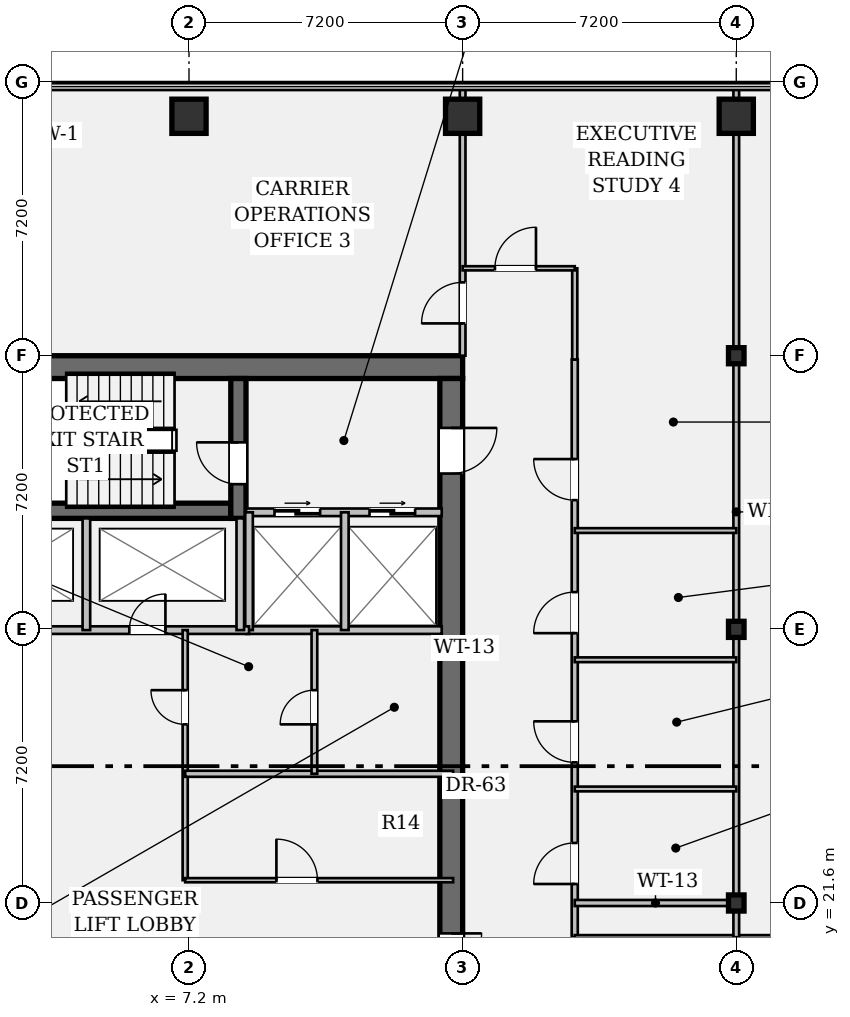
"""IFC4 building model, lengths in metres.
Left out: names, types, materials, properties, quantities, classifications, styles, units other than length and angle.
Written with IfcOpenShell. Run it as: python <this file> out.ifc"""

import sys

from ifc_helpers import new_model, si_unit, direction, frame, frame_2d, origin, origin_2d, place, context, subcontext, project, spatial, rectangle, hollow_rectangle, i_section, extrude, element, fill, save


model = new_model("IFC4")
c1 = context("Model", 3, precision=1e-05, world=origin(), true_north=direction((0.0, 1.0)))
c2 = subcontext(c1, "Body", "Model", "MODEL_VIEW")
j1 = project(units=[si_unit("LENGTHUNIT", "METRE"), si_unit("PLANEANGLEUNIT", "RADIAN")], contexts=[c1])
p1 = place(None, origin())
s1 = spatial("IfcSite", under=j1, at=p1, CompositionType="ELEMENT")
p2 = place(p1, origin())
s2 = spatial("IfcBuilding", under=s1, at=p2, CompositionType="ELEMENT")
p3 = place(p2, frame((0.0, 0.0, 133.0)))
s3 = spatial("IfcBuildingStorey", under=s2, at=p3, CompositionType="ELEMENT", Elevation=133.0)
p4 = place(p3, frame((0.6, 35.7, 0.0), z_axis=(0.0, 0.0, 1.0), x_axis=(1.0, 0.0, 0.0)))
e1 = element("IfcWall", 1, at=p4, inside=s3, PredefinedType="SHEAR", context=c2, shape_type="SweptSolid", body=[
    extrude(rectangle(XDim=13.8, YDim=0.6, at=frame_2d((6.9, 0.0))), origin(), (0.0, 0.0, 1.0), 3.58),
])
p5 = place(p3, frame((14.1, 35.4, 0.0), z_axis=(0.0, 0.0, 1.0), x_axis=(0.0, -1.0, 0.0)))
e2 = element("IfcWall", 2, at=p5, inside=s3, PredefinedType="SHEAR", context=c2, shape_type="SweptSolid", body=[
    extrude(rectangle(XDim=27.6, YDim=0.6, at=frame_2d((13.8, 0.0))), origin(), (0.0, 0.0, 1.0), 3.58),
])
p6 = place(p5, frame((1.3, 0.0, 0.0)))
e3 = element("IfcOpeningElement", 3, at=p6, cuts=e2, PredefinedType="OPENING", context=c2, shape_type="SweptSolid", body=[
    extrude(rectangle(XDim=1.2, YDim=2.15, at=frame_2d((0.6, 1.075))), frame((0.0, 0.312, 0.0), z_axis=(0.0, -1.0, 0.0), x_axis=(1.0, 0.0, 0.0)), (0.0, 0.0, 1.0), 0.624),
])
p7 = place(p5, frame((25.25, 0.0, 0.0)))
e4 = element("IfcOpeningElement", 4, at=p7, cuts=e2, PredefinedType="OPENING", context=c2, shape_type="SweptSolid", body=[
    extrude(rectangle(XDim=1.2, YDim=2.15, at=frame_2d((0.6, 1.075))), frame((0.0, 0.312, 0.0), z_axis=(0.0, -1.0, 0.0), x_axis=(1.0, 0.0, 0.0)), (0.0, 0.0, 1.0), 0.624),
])
p8 = place(p5, frame((14.6, 0.0, 0.0)))
e5 = element("IfcOpeningElement", 5, at=p8, cuts=e2, PredefinedType="OPENING", context=c2, shape_type="SweptSolid", body=[
    extrude(rectangle(XDim=1.6, YDim=2.2, at=frame_2d((0.8, 1.1))), frame((0.0, 0.312, 0.0), z_axis=(0.0, -1.0, 0.0), x_axis=(1.0, 0.0, 0.0)), (0.0, 0.0, 1.0), 0.624),
])
p9 = place(p3, frame((0.6, 31.92, 0.0), z_axis=(0.0, 0.0, 1.0), x_axis=(1.0, 0.0, 0.0)))
e6 = element("IfcWall", 6, at=p9, inside=s3, PredefinedType="SHEAR", context=c2, shape_type="SweptSolid", body=[
    extrude(rectangle(XDim=7.7, YDim=0.4, at=frame_2d((3.85, 0.0))), origin(), (0.0, 0.0, 1.0), 3.58),
])
p10 = place(p3, frame((8.5, 31.72, 0.0), z_axis=(0.0, 0.0, 1.0), x_axis=(0.0, 1.0, 0.0)))
e7 = element("IfcWall", 7, at=p10, inside=s3, PredefinedType="SHEAR", context=c2, shape_type="SweptSolid", body=[
    extrude(rectangle(XDim=3.68, YDim=0.4, at=frame_2d((1.84, 0.0))), origin(), (0.0, 0.0, 1.0), 3.58),
])
p11 = place(p10, frame((0.9, 0.0, 0.0)))
e8 = element("IfcOpeningElement", 8, at=p11, cuts=e7, PredefinedType="OPENING", context=c2, shape_type="SweptSolid", body=[
    extrude(rectangle(XDim=1.1, YDim=2.15, at=frame_2d((0.55, 1.075))), frame((0.0, 0.212, 0.0), z_axis=(0.0, -1.0, 0.0), x_axis=(1.0, 0.0, 0.0)), (0.0, 0.0, 1.0), 0.424),
])
for number, where, z_axis, x_axis in (
    (9, (7.2, 42.3, 0.0), (0.0, 0.0, 1.0), (1.0, 0.0, 0.0)),
    (10, (14.4, 42.3, 0.0), (0.0, 0.0, 1.0), (1.0, 0.0, 0.0)),
):
    element("IfcColumn", number, at=place(p3, frame(where, z_axis=z_axis, x_axis=x_axis)), inside=s3, PredefinedType="COLUMN", context=c2, shape_type="SweptSolid", body=[
        extrude(hollow_rectangle(XDim=0.9, YDim=0.9, WallThickness=0.055, at=origin_2d()), origin(), (0.0, 0.0, 1.0), 3.58),
    ])
for number, where, z_axis, x_axis in (
    (11, (21.6, 21.6, 0.0), (0.0, 0.0, 1.0), (1.0, 0.0, 0.0)),
    (12, (21.6, 28.8, 0.0), (0.0, 0.0, 1.0), (1.0, 0.0, 0.0)),
    (13, (21.6, 36.0, 0.0), (0.0, 0.0, 1.0), (1.0, 0.0, 0.0)),
):
    element("IfcColumn", number, at=place(p3, frame(where, z_axis=z_axis, x_axis=x_axis)), inside=s3, PredefinedType="COLUMN", context=c2, shape_type="SweptSolid", body=[
        extrude(i_section(OverallWidth=0.409, OverallDepth=0.424, WebThickness=0.033, FlangeThickness=0.052, FilletRadius=0.018, at=origin_2d()), origin(), (0.0, 0.0, 1.0), 3.58),
    ])
p12 = place(p3, frame((21.6, 42.3, 0.0), z_axis=(0.0, 0.0, 1.0), x_axis=(1.0, 0.0, 0.0)))
e14 = element("IfcColumn", 14, at=p12, inside=s3, PredefinedType="COLUMN", context=c2, shape_type="SweptSolid", body=[
    extrude(hollow_rectangle(XDim=0.9, YDim=0.9, WallThickness=0.055, at=origin_2d()), origin(), (0.0, 0.0, 1.0), 3.58),
])
p13 = place(p3, frame((8.7, 31.88, 0.0), z_axis=(0.0, 0.0, 1.0), x_axis=(1.0, 0.0, 0.0)))
e15 = element("IfcWall", 15, at=p13, inside=s3, PredefinedType="PARTITIONING", context=c2, shape_type="SweptSolid", body=[
    extrude(rectangle(XDim=5.15, YDim=0.2, at=frame_2d((2.575, 0.0))), origin(), (0.0, 0.0, 1.0), 3.58),
])
p14 = place(p13, frame((0.75, 0.0, 0.0)))
e16 = element("IfcOpeningElement", 16, at=p14, cuts=e15, PredefinedType="OPENING", context=c2, shape_type="SweptSolid", body=[
    extrude(rectangle(XDim=1.2, YDim=2.2, at=frame_2d((0.6, 1.1))), frame((0.0, 0.112, 0.0), z_axis=(0.0, -1.0, 0.0), x_axis=(1.0, 0.0, 0.0)), (0.0, 0.0, 1.0), 0.224),
])
p15 = place(p13, frame((3.25, 0.0, 0.0)))
e17 = element("IfcOpeningElement", 17, at=p15, cuts=e15, PredefinedType="OPENING", context=c2, shape_type="SweptSolid", body=[
    extrude(rectangle(XDim=1.2, YDim=2.2, at=frame_2d((0.6, 1.1))), frame((0.0, 0.112, 0.0), z_axis=(0.0, -1.0, 0.0), x_axis=(1.0, 0.0, 0.0)), (0.0, 0.0, 1.0), 0.224),
])
p16 = place(p3, frame((8.7, 28.78, 0.0), z_axis=(0.0, 0.0, 1.0), x_axis=(1.0, 0.0, 0.0)))
e18 = element("IfcWall", 18, at=p16, inside=s3, PredefinedType="PARTITIONING", context=c2, shape_type="SweptSolid", body=[
    extrude(rectangle(XDim=5.15, YDim=0.2, at=frame_2d((2.575, 0.0))), origin(), (0.0, 0.0, 1.0), 3.58),
])
for number, where, z_axis, x_axis in (
    (19, (8.78, 28.78, 0.0), (0.0, 0.0, 1.0), (0.0, 1.0, 0.0)),
    (20, (11.3, 28.78, 0.0), (0.0, 0.0, 1.0), (0.0, 1.0, 0.0)),
):
    element("IfcWall", number, at=place(p3, frame(where, z_axis=z_axis, x_axis=x_axis)), inside=s3, PredefinedType="PARTITIONING", context=c2, shape_type="SweptSolid", body=[
        extrude(rectangle(XDim=3.1, YDim=0.2, at=frame_2d((1.55, 0.0))), origin(), (0.0, 0.0, 1.0), 3.58),
    ])
p17 = place(p3, frame((0.6, 28.78, 0.0), z_axis=(0.0, 0.0, 1.0), x_axis=(1.0, 0.0, 0.0)))
e21 = element("IfcWall", 21, at=p17, inside=s3, PredefinedType="PARTITIONING", context=c2, shape_type="SweptSolid", body=[
    extrude(rectangle(XDim=8.18, YDim=0.2, at=frame_2d((4.09, 0.0))), origin(), (0.0, 0.0, 1.0), 3.58),
])
p18 = place(p17, frame((1.21, 0.0, 0.0)))
e22 = element("IfcOpeningElement", 22, at=p18, cuts=e21, PredefinedType="OPENING", context=c2, shape_type="SweptSolid", body=[
    extrude(rectangle(XDim=0.95, YDim=2.15, at=frame_2d((0.475, 1.075))), frame((0.0, 0.112, 0.0), z_axis=(0.0, -1.0, 0.0), x_axis=(1.0, 0.0, 0.0)), (0.0, 0.0, 1.0), 0.224),
])
p19 = place(p17, frame((5.03, 0.0, 0.0)))
e23 = element("IfcOpeningElement", 23, at=p19, cuts=e21, PredefinedType="OPENING", context=c2, shape_type="SweptSolid", body=[
    extrude(rectangle(XDim=0.95, YDim=2.15, at=frame_2d((0.475, 1.075))), frame((0.0, 0.112, 0.0), z_axis=(0.0, -1.0, 0.0), x_axis=(1.0, 0.0, 0.0)), (0.0, 0.0, 1.0), 0.224),
])
for number, where, z_axis, x_axis in (
    (24, (4.5, 28.78, 0.0), (0.0, 0.0, 1.0), (0.0, 1.0, 0.0)),
    (25, (8.55, 28.78, 0.0), (0.0, 0.0, 1.0), (0.0, 1.0, 0.0)),
):
    element("IfcWall", number, at=place(p3, frame(where, z_axis=z_axis, x_axis=x_axis)), inside=s3, PredefinedType="PARTITIONING", context=c2, shape_type="SweptSolid", body=[
        extrude(rectangle(XDim=2.94, YDim=0.2, at=frame_2d((1.47, 0.0))), origin(), (0.0, 0.0, 1.0), 3.58),
    ])
p20 = place(p3, frame((7.1, 22.2, 0.0), z_axis=(0.0, 0.0, 1.0), x_axis=(0.0, 1.0, 0.0)))
e26 = element("IfcWall", 26, at=p20, inside=s3, PredefinedType="PARTITIONING", context=c2, shape_type="SweptSolid", body=[
    extrude(rectangle(XDim=6.58, YDim=0.135, at=frame_2d((3.29, 0.0))), origin(), (0.0, 0.0, 1.0), 3.58),
])
p21 = place(p20, frame((4.1, 0.0, 0.0)))
e27 = element("IfcOpeningElement", 27, at=p21, cuts=e26, PredefinedType="OPENING", context=c2, shape_type="SweptSolid", body=[
    extrude(rectangle(XDim=0.9, YDim=2.15, at=frame_2d((0.45, 1.075))), frame((0.0, 0.08, 0.0), z_axis=(0.0, -1.0, 0.0), x_axis=(1.0, 0.0, 0.0)), (0.0, 0.0, 1.0), 0.159),
])
p22 = place(p3, frame((7.1, 22.2, 0.0), z_axis=(0.0, 0.0, 1.0), x_axis=(1.0, 0.0, 0.0)))
e28 = element("IfcWall", 28, at=p22, inside=s3, PredefinedType="PARTITIONING", context=c2, shape_type="SweptSolid", body=[
    extrude(rectangle(XDim=7.05, YDim=0.11, at=frame_2d((3.525, 0.0))), origin(), (0.0, 0.0, 1.0), 3.58),
])
p23 = place(p22, frame((2.4, 0.0, 0.0)))
e29 = element("IfcOpeningElement", 29, at=p23, cuts=e28, PredefinedType="OPENING", context=c2, shape_type="SweptSolid", body=[
    extrude(rectangle(XDim=1.08, YDim=2.15, at=frame_2d((0.54, 1.075))), frame((0.0, 0.067, 0.0), z_axis=(0.0, -1.0, 0.0), x_axis=(1.0, 0.0, 0.0)), (0.0, 0.0, 1.0), 0.134),
])
p24 = place(p3, frame((7.1, 25.0, 0.0), z_axis=(0.0, 0.0, 1.0), x_axis=(1.0, 0.0, 0.0)))
e30 = element("IfcWall", 30, at=p24, inside=s3, PredefinedType="PARTITIONING", context=c2, shape_type="SweptSolid", body=[
    extrude(rectangle(XDim=7.05, YDim=0.16, at=frame_2d((3.525, 0.0))), origin(), (0.0, 0.0, 1.0), 3.58),
])
p25 = place(p3, frame((10.5, 25.0, 0.0), z_axis=(0.0, 0.0, 1.0), x_axis=(0.0, 1.0, 0.0)))
e31 = element("IfcWall", 31, at=p25, inside=s3, PredefinedType="PARTITIONING", context=c2, shape_type="SweptSolid", body=[
    extrude(rectangle(XDim=3.78, YDim=0.15, at=frame_2d((1.89, 0.0))), origin(), (0.0, 0.0, 1.0), 3.58),
])
p26 = place(p25, frame((1.3, 0.0, 0.0)))
e32 = element("IfcOpeningElement", 32, at=p26, cuts=e31, PredefinedType="OPENING", context=c2, shape_type="SweptSolid", body=[
    extrude(rectangle(XDim=0.9, YDim=2.15, at=frame_2d((0.45, 1.075))), frame((0.0, 0.087, 0.0), z_axis=(0.0, -1.0, 0.0), x_axis=(1.0, 0.0, 0.0)), (0.0, 0.0, 1.0), 0.174),
])
p27 = place(p3, frame((17.35, 20.7, 0.0), z_axis=(0.0, 0.0, 1.0), x_axis=(0.0, 1.0, 0.0)))
e33 = element("IfcWall", 33, at=p27, inside=s3, PredefinedType="PARTITIONING", context=c2, shape_type="SweptSolid", body=[
    extrude(rectangle(XDim=15.2, YDim=0.16, at=frame_2d((7.6, 0.0))), origin(), (0.0, 0.0, 1.0), 2.869),
])
p28 = place(p27, frame((1.4, 0.0, 0.0)))
e34 = element("IfcOpeningElement", 34, at=p28, cuts=e33, PredefinedType="OPENING", context=c2, shape_type="SweptSolid", body=[
    extrude(rectangle(XDim=1.08, YDim=2.15, at=frame_2d((0.54, 1.075))), frame((0.0, 0.092, 0.0), z_axis=(0.0, -1.0, 0.0), x_axis=(1.0, 0.0, 0.0)), (0.0, 0.0, 1.0), 0.184),
])
p29 = place(p27, frame((4.6, 0.0, 0.0)))
e35 = element("IfcOpeningElement", 35, at=p29, cuts=e33, PredefinedType="OPENING", context=c2, shape_type="SweptSolid", body=[
    extrude(rectangle(XDim=1.08, YDim=2.15, at=frame_2d((0.54, 1.075))), frame((0.0, 0.092, 0.0), z_axis=(0.0, -1.0, 0.0), x_axis=(1.0, 0.0, 0.0)), (0.0, 0.0, 1.0), 0.184),
])
p30 = place(p27, frame((8.0, 0.0, 0.0)))
e36 = element("IfcOpeningElement", 36, at=p30, cuts=e33, PredefinedType="OPENING", context=c2, shape_type="SweptSolid", body=[
    extrude(rectangle(XDim=1.08, YDim=2.15, at=frame_2d((0.54, 1.075))), frame((0.0, 0.092, 0.0), z_axis=(0.0, -1.0, 0.0), x_axis=(1.0, 0.0, 0.0)), (0.0, 0.0, 1.0), 0.184),
])
p31 = place(p27, frame((11.5, 0.0, 0.0)))
e37 = element("IfcOpeningElement", 37, at=p31, cuts=e33, PredefinedType="OPENING", context=c2, shape_type="SweptSolid", body=[
    extrude(rectangle(XDim=1.08, YDim=2.15, at=frame_2d((0.54, 1.075))), frame((0.0, 0.092, 0.0), z_axis=(0.0, -1.0, 0.0), x_axis=(1.0, 0.0, 0.0)), (0.0, 0.0, 1.0), 0.184),
])
p32 = place(p3, frame((17.35, 20.7, 0.0), z_axis=(0.0, 0.0, 1.0), x_axis=(1.0, 0.0, 0.0)))
e38 = element("IfcWall", 38, at=p32, inside=s3, PredefinedType="PARTITIONING", context=c2, shape_type="SweptSolid", body=[
    extrude(rectangle(XDim=19.95, YDim=0.11, at=frame_2d((9.975, 0.0))), origin(), (0.0, 0.0, 1.0), 2.869),
])
p33 = place(p32, frame((5.52, 0.0, 0.0)))
e39 = element("IfcOpeningElement", 39, at=p33, cuts=e38, PredefinedType="OPENING", context=c2, shape_type="SweptSolid", body=[
    extrude(rectangle(XDim=1.0, YDim=2.15, at=frame_2d((0.5, 1.075))), frame((0.0, 0.067, 0.0), z_axis=(0.0, -1.0, 0.0), x_axis=(1.0, 0.0, 0.0)), (0.0, 0.0, 1.0), 0.134),
])
p34 = place(p32, frame((9.05, 0.0, 0.0)))
e40 = element("IfcOpeningElement", 40, at=p34, cuts=e38, PredefinedType="OPENING", context=c2, shape_type="SweptSolid", body=[
    extrude(rectangle(XDim=1.08, YDim=2.15, at=frame_2d((0.54, 1.075))), frame((0.0, 0.067, 0.0), z_axis=(0.0, -1.0, 0.0), x_axis=(1.0, 0.0, 0.0)), (0.0, 0.0, 1.0), 0.134),
])
p35 = place(p3, frame((17.35, 21.6, 0.0), z_axis=(0.0, 0.0, 1.0), x_axis=(1.0, 0.0, 0.0)))
e41 = element("IfcWall", 41, at=p35, inside=s3, PredefinedType="PARTITIONING", context=c2, shape_type="SweptSolid", body=[
    extrude(rectangle(XDim=4.25, YDim=0.16, at=frame_2d((2.125, 0.0))), origin(), (0.0, 0.0, 1.0), 2.869),
])
p36 = place(p3, frame((21.6, 20.7, 0.0), z_axis=(0.0, 0.0, 1.0), x_axis=(0.0, 1.0, 0.0)))
e42 = element("IfcWall", 42, at=p36, inside=s3, PredefinedType="PARTITIONING", context=c2, shape_type="SweptSolid", body=[
    extrude(rectangle(XDim=22.38, YDim=0.15, at=frame_2d((11.19, 0.0))), origin(), (0.0, 0.0, 1.0), 2.869),
])
for number, where, z_axis, x_axis in (
    (43, (17.35, 24.6, 0.0), (0.0, 0.0, 1.0), (1.0, 0.0, 0.0)),
    (44, (17.35, 28.0, 0.0), (0.0, 0.0, 1.0), (1.0, 0.0, 0.0)),
    (45, (17.35, 31.4, 0.0), (0.0, 0.0, 1.0), (1.0, 0.0, 0.0)),
):
    element("IfcWall", number, at=place(p3, frame(where, z_axis=z_axis, x_axis=x_axis)), inside=s3, PredefinedType="PARTITIONING", context=c2, shape_type="SweptSolid", body=[
        extrude(rectangle(XDim=4.25, YDim=0.125, at=frame_2d((2.125, 0.0))), origin(), (0.0, 0.0, 1.0), 2.869),
    ])
p37 = place(p3, frame((14.4, 36.0, 0.0), z_axis=(0.0, 0.0, 1.0), x_axis=(0.0, 1.0, 0.0)))
e46 = element("IfcWall", 46, at=p37, inside=s3, PredefinedType="PARTITIONING", context=c2, shape_type="SweptSolid", body=[
    extrude(rectangle(XDim=7.08, YDim=0.15, at=frame_2d((3.54, 0.0))), origin(), (0.0, 0.0, 1.0), 2.869),
])
p38 = place(p37, frame((0.85, 0.0, 0.0)))
e47 = element("IfcOpeningElement", 47, at=p38, cuts=e46, PredefinedType="OPENING", context=c2, shape_type="SweptSolid", body=[
    extrude(rectangle(XDim=1.08, YDim=2.15, at=frame_2d((0.54, 1.075))), frame((0.0, 0.087, 0.0), z_axis=(0.0, -1.0, 0.0), x_axis=(1.0, 0.0, 0.0)), (0.0, 0.0, 1.0), 0.174),
])
p39 = place(p3, frame((17.35, 35.9, 0.0), z_axis=(0.0, 0.0, 1.0), x_axis=(0.0, 1.0, 0.0)))
e48 = element("IfcWall", 48, at=p39, inside=s3, PredefinedType="PARTITIONING", context=c2, shape_type="SweptSolid", body=[
    extrude(rectangle(XDim=2.4, YDim=0.135, at=frame_2d((1.2, 0.0))), origin(), (0.0, 0.0, 1.0), 2.869),
])
p40 = place(p3, frame((14.4, 38.3, 0.0), z_axis=(0.0, 0.0, 1.0), x_axis=(1.0, 0.0, 0.0)))
e49 = element("IfcWall", 49, at=p40, inside=s3, PredefinedType="PARTITIONING", context=c2, shape_type="SweptSolid", body=[
    extrude(rectangle(XDim=2.95, YDim=0.11, at=frame_2d((1.475, 0.0))), origin(), (0.0, 0.0, 1.0), 3.148),
])
p41 = place(p40, frame((0.85, 0.0, 0.0)))
e50 = element("IfcOpeningElement", 50, at=p41, cuts=e49, PredefinedType="OPENING", context=c2, shape_type="SweptSolid", body=[
    extrude(rectangle(XDim=1.08, YDim=2.15, at=frame_2d((0.54, 1.075))), frame((0.0, 0.067, 0.0), z_axis=(0.0, -1.0, 0.0), x_axis=(1.0, 0.0, 0.0)), (0.0, 0.0, 1.0), 0.134),
])
p42 = place(p11, origin())
e51 = element("IfcDoor", 51, at=p42, inside=s3, OperationType="SINGLE_SWING_RIGHT", PredefinedType="DOOR", context=c2, shape_type="SweptSolid", body=[
    extrude(rectangle(XDim=1.1, YDim=2.15, at=frame_2d((0.55, 1.075))), frame((0.0, 0.025, 0.0), z_axis=(0.0, -1.0, 0.0), x_axis=(1.0, 0.0, 0.0)), (0.0, 0.0, 1.0), 0.05),
])
fill(e8, e51)
p43 = place(p6, origin())
e52 = element("IfcDoor", 52, at=p43, inside=s3, OperationType="SINGLE_SWING_LEFT", PredefinedType="DOOR", context=c2, shape_type="SweptSolid", body=[
    extrude(rectangle(XDim=1.2, YDim=2.15, at=frame_2d((0.6, 1.075))), frame((0.0, 0.025, 0.0), z_axis=(0.0, -1.0, 0.0), x_axis=(1.0, 0.0, 0.0)), (0.0, 0.0, 1.0), 0.05),
])
fill(e3, e52)
p44 = place(p14, origin())
e53 = element("IfcDoor", 53, at=p44, inside=s3, OperationType="DOUBLE_DOOR_SLIDING", PredefinedType="DOOR", context=c2, shape_type="SweptSolid", body=[
    extrude(rectangle(XDim=1.2, YDim=2.2, at=frame_2d((0.6, 1.1))), frame((0.0, 0.025, 0.0), z_axis=(0.0, -1.0, 0.0), x_axis=(1.0, 0.0, 0.0)), (0.0, 0.0, 1.0), 0.05),
])
fill(e16, e53)
p45 = place(p15, origin())
e54 = element("IfcDoor", 54, at=p45, inside=s3, OperationType="DOUBLE_DOOR_SLIDING", PredefinedType="DOOR", context=c2, shape_type="SweptSolid", body=[
    extrude(rectangle(XDim=1.2, YDim=2.2, at=frame_2d((0.6, 1.1))), frame((0.0, 0.025, 0.0), z_axis=(0.0, -1.0, 0.0), x_axis=(1.0, 0.0, 0.0)), (0.0, 0.0, 1.0), 0.05),
])
fill(e17, e54)
p46 = place(p19, origin())
e55 = element("IfcDoor", 55, at=p46, inside=s3, OperationType="SINGLE_SWING_RIGHT", PredefinedType="DOOR", context=c2, shape_type="SweptSolid", body=[
    extrude(rectangle(XDim=0.95, YDim=2.15, at=frame_2d((0.475, 1.075))), frame((0.0, 0.025, 0.0), z_axis=(0.0, -1.0, 0.0), x_axis=(1.0, 0.0, 0.0)), (0.0, 0.0, 1.0), 0.05),
])
fill(e23, e55)
p47 = place(p8, origin())
e56 = element("IfcDoor", 56, at=p47, inside=s3, OperationType="DOUBLE_DOOR_SINGLE_SWING", PredefinedType="DOOR", context=c2, shape_type="SweptSolid", body=[
    extrude(rectangle(XDim=1.6, YDim=2.2, at=frame_2d((0.8, 1.1))), frame((0.0, 0.025, 0.0), z_axis=(0.0, -1.0, 0.0), x_axis=(1.0, 0.0, 0.0)), (0.0, 0.0, 1.0), 0.05),
])
fill(e5, e56)
p48 = place(p23, origin())
e57 = element("IfcDoor", 57, at=p48, inside=s3, OperationType="SINGLE_SWING_LEFT", PredefinedType="DOOR", context=c2, shape_type="SweptSolid", body=[
    extrude(rectangle(XDim=1.08, YDim=2.15, at=frame_2d((0.54, 1.075))), frame((0.0, 0.025, 0.0), z_axis=(0.0, -1.0, 0.0), x_axis=(1.0, 0.0, 0.0)), (0.0, 0.0, 1.0), 0.05),
])
fill(e29, e57)
p49 = place(p21, origin())
e58 = element("IfcDoor", 58, at=p49, inside=s3, OperationType="SINGLE_SWING_RIGHT", PredefinedType="DOOR", context=c2, shape_type="SweptSolid", body=[
    extrude(rectangle(XDim=0.9, YDim=2.15, at=frame_2d((0.45, 1.075))), frame((0.0, 0.025, 0.0), z_axis=(0.0, -1.0, 0.0), x_axis=(1.0, 0.0, 0.0)), (0.0, 0.0, 1.0), 0.05),
])
fill(e27, e58)
p50 = place(p26, origin())
e59 = element("IfcDoor", 59, at=p50, inside=s3, OperationType="SINGLE_SWING_LEFT", PredefinedType="DOOR", context=c2, shape_type="SweptSolid", body=[
    extrude(rectangle(XDim=0.9, YDim=2.15, at=frame_2d((0.45, 1.075))), frame((0.0, 0.025, 0.0), z_axis=(0.0, -1.0, 0.0), x_axis=(1.0, 0.0, 0.0)), (0.0, 0.0, 1.0), 0.05),
])
fill(e32, e59)
p51 = place(p28, origin())
e60 = element("IfcDoor", 60, at=p51, inside=s3, OperationType="SINGLE_SWING_LEFT", PredefinedType="DOOR", context=c2, shape_type="SweptSolid", body=[
    extrude(rectangle(XDim=1.08, YDim=2.15, at=frame_2d((0.54, 1.075))), frame((0.0, 0.025, 0.0), z_axis=(0.0, -1.0, 0.0), x_axis=(1.0, 0.0, 0.0)), (0.0, 0.0, 1.0), 0.05),
])
fill(e34, e60)
p52 = place(p29, origin())
e61 = element("IfcDoor", 61, at=p52, inside=s3, OperationType="SINGLE_SWING_RIGHT", PredefinedType="DOOR", context=c2, shape_type="SweptSolid", body=[
    extrude(rectangle(XDim=1.08, YDim=2.15, at=frame_2d((0.54, 1.075))), frame((0.0, 0.025, 0.0), z_axis=(0.0, -1.0, 0.0), x_axis=(1.0, 0.0, 0.0)), (0.0, 0.0, 1.0), 0.05),
])
fill(e35, e61)
p53 = place(p30, origin())
e62 = element("IfcDoor", 62, at=p53, inside=s3, OperationType="SINGLE_SWING_LEFT", PredefinedType="DOOR", context=c2, shape_type="SweptSolid", body=[
    extrude(rectangle(XDim=1.08, YDim=2.15, at=frame_2d((0.54, 1.075))), frame((0.0, 0.025, 0.0), z_axis=(0.0, -1.0, 0.0), x_axis=(1.0, 0.0, 0.0)), (0.0, 0.0, 1.0), 0.05),
])
fill(e36, e62)
p54 = place(p31, origin())
e63 = element("IfcDoor", 63, at=p54, inside=s3, OperationType="SINGLE_SWING_RIGHT", PredefinedType="DOOR", context=c2, shape_type="SweptSolid", body=[
    extrude(rectangle(XDim=1.08, YDim=2.15, at=frame_2d((0.54, 1.075))), frame((0.0, 0.025, 0.0), z_axis=(0.0, -1.0, 0.0), x_axis=(1.0, 0.0, 0.0)), (0.0, 0.0, 1.0), 0.05),
])
fill(e37, e63)
p55 = place(p38, origin())
e64 = element("IfcDoor", 64, at=p55, inside=s3, OperationType="SINGLE_SWING_LEFT", PredefinedType="DOOR", context=c2, shape_type="SweptSolid", body=[
    extrude(rectangle(XDim=1.08, YDim=2.15, at=frame_2d((0.54, 1.075))), frame((0.0, 0.025, 0.0), z_axis=(0.0, -1.0, 0.0), x_axis=(1.0, 0.0, 0.0)), (0.0, 0.0, 1.0), 0.05),
])
fill(e47, e64)
p56 = place(p41, origin())
e65 = element("IfcDoor", 65, at=p56, inside=s3, OperationType="SINGLE_SWING_RIGHT", PredefinedType="DOOR", context=c2, shape_type="SweptSolid", body=[
    extrude(rectangle(XDim=1.08, YDim=2.15, at=frame_2d((0.54, 1.075))), frame((0.0, 0.025, 0.0), z_axis=(0.0, -1.0, 0.0), x_axis=(1.0, 0.0, 0.0)), (0.0, 0.0, 1.0), 0.05),
])
fill(e50, e65)
save(model, sys.argv[1])
